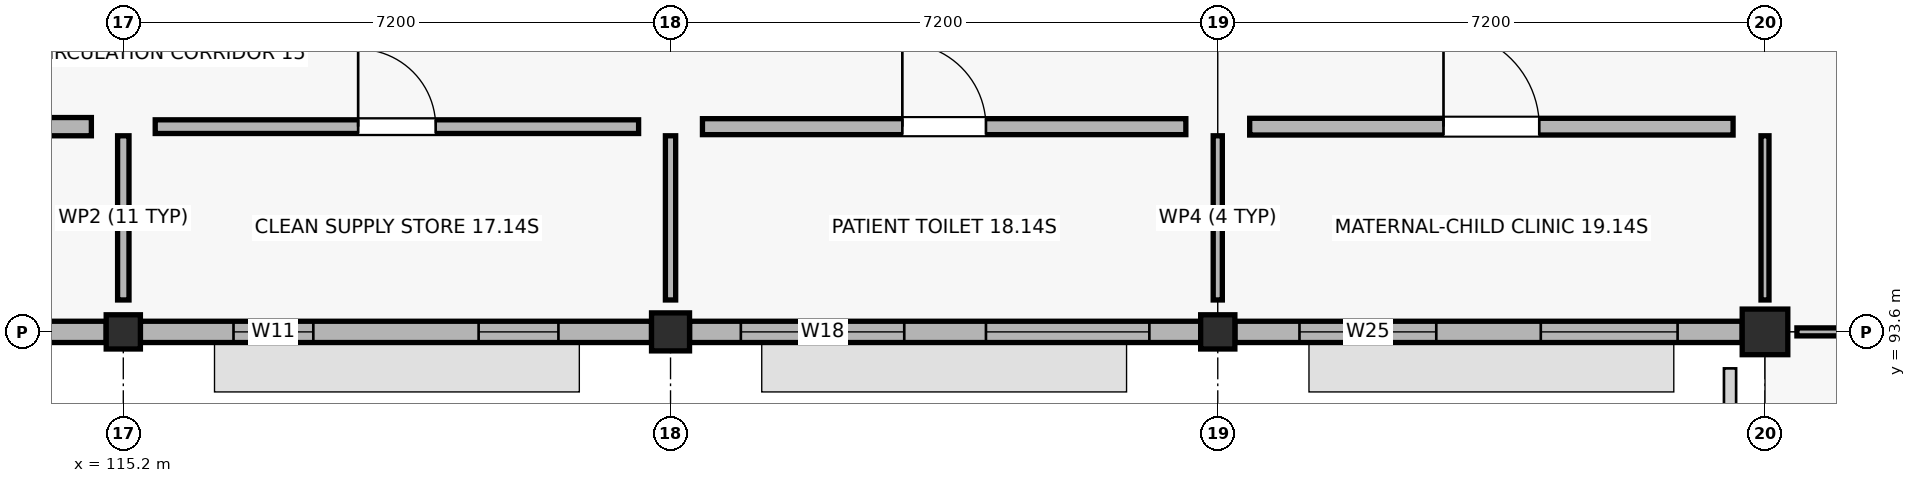
"""IFC4 building model, lengths in metres.
Left out: names, types, materials, properties, quantities, classifications, styles, units other than length and angle.
Written with IfcOpenShell. Run it as: python <this file> out.ifc"""

import sys

from ifc_helpers import new_model, si_unit, direction, frame, frame_2d, origin, origin_2d, place, context, subcontext, project, spatial, rectangle, extrude, element, fill, save


model = new_model("IFC4")
c1 = context("Model", 3, precision=1e-05, world=origin(), true_north=direction((0.0, 1.0)))
c2 = subcontext(c1, "Body", "Model", "MODEL_VIEW")
j1 = project(units=[si_unit("LENGTHUNIT", "METRE"), si_unit("PLANEANGLEUNIT", "RADIAN")], contexts=[c1])
p1 = place(None, origin())
s1 = spatial("IfcSite", under=j1, at=p1, CompositionType="ELEMENT")
p2 = place(p1, origin())
s2 = spatial("IfcBuilding", under=s1, at=p2, CompositionType="ELEMENT")
p3 = place(p2, frame((0.0, 0.0, 4.5)))
s3 = spatial("IfcBuildingStorey", under=s2, at=p3, CompositionType="ELEMENT", Elevation=4.5)
p4 = place(p3, frame((115.2, 93.6, 0.0), z_axis=(0.0, 0.0, 1.0), x_axis=(1.0, 0.0, 0.0)))
e1 = element("IfcColumn", 1, at=p4, inside=s3, PredefinedType="COLUMN", context=c2, shape_type="SweptSolid", body=[
    extrude(rectangle(XDim=0.45, YDim=0.45, at=origin_2d()), origin(), (0.0, 0.0, 1.0), 4.28),
])
p5 = place(p3, frame((122.4, 93.6, 0.0), z_axis=(0.0, 0.0, 1.0), x_axis=(1.0, 0.0, 0.0)))
e2 = element("IfcColumn", 2, at=p5, inside=s3, PredefinedType="COLUMN", context=c2, shape_type="SweptSolid", body=[
    extrude(rectangle(XDim=0.5, YDim=0.5, at=origin_2d()), origin(), (0.0, 0.0, 1.0), 4.28),
])
p6 = place(p3, frame((129.6, 93.6, 0.0), z_axis=(0.0, 0.0, 1.0), x_axis=(1.0, 0.0, 0.0)))
e3 = element("IfcColumn", 3, at=p6, inside=s3, PredefinedType="COLUMN", context=c2, shape_type="SweptSolid", body=[
    extrude(rectangle(XDim=0.45, YDim=0.45, at=origin_2d()), origin(), (0.0, 0.0, 1.0), 4.28),
])
p7 = place(p3, frame((136.8, 93.6, 0.0), z_axis=(0.0, 0.0, 1.0), x_axis=(1.0, 0.0, 0.0)))
e4 = element("IfcColumn", 4, at=p7, inside=s3, PredefinedType="COLUMN", context=c2, shape_type="SweptSolid", body=[
    extrude(rectangle(XDim=0.6, YDim=0.6, at=origin_2d()), origin(), (0.0, 0.0, 1.0), 4.5),
])
p8 = place(p3, frame((108.25, 93.6, 0.0), z_axis=(0.0, 0.0, 1.0), x_axis=(1.0, 0.0, 0.0)))
e5 = element("IfcWall", 5, at=p8, inside=s3, PredefinedType="STANDARD", context=c2, shape_type="SweptSolid", body=[
    extrude(rectangle(XDim=6.725, YDim=0.28, at=frame_2d((3.363, 0.0))), origin(), (0.0, 0.0, 1.0), 3.47),
])
p9 = place(p8, frame((1.075, 0.0, 0.9)))
e6 = element("IfcOpeningElement", 6, at=p9, cuts=e5, PredefinedType="OPENING", context=c2, shape_type="SweptSolid", body=[
    extrude(rectangle(XDim=1.35, YDim=1.25, at=frame_2d((0.675, 0.625))), frame((0.0, 0.15, 0.0), z_axis=(0.0, -1.0, 0.0), x_axis=(1.0, 0.0, 0.0)), (0.0, 0.0, 1.0), 0.3),
])
p10 = place(p8, frame((4.3, 0.0, 0.9)))
e7 = element("IfcOpeningElement", 7, at=p10, cuts=e5, PredefinedType="OPENING", context=c2, shape_type="SweptSolid", body=[
    extrude(rectangle(XDim=1.35, YDim=1.25, at=frame_2d((0.675, 0.625))), frame((0.0, 0.15, 0.0), z_axis=(0.0, -1.0, 0.0), x_axis=(1.0, 0.0, 0.0)), (0.0, 0.0, 1.0), 0.3),
])
p11 = place(p3, frame((115.425, 93.6, 0.0), z_axis=(0.0, 0.0, 1.0), x_axis=(1.0, 0.0, 0.0)))
e8 = element("IfcWall", 8, at=p11, inside=s3, PredefinedType="STANDARD", context=c2, shape_type="SweptSolid", body=[
    extrude(rectangle(XDim=6.725, YDim=0.28, at=frame_2d((3.362, 0.0))), origin(), (0.0, 0.0, 1.0), 3.47),
])
p12 = place(p11, frame((1.225, 0.0, 0.9)))
e9 = element("IfcOpeningElement", 9, at=p12, cuts=e8, PredefinedType="OPENING", context=c2, shape_type="SweptSolid", body=[
    extrude(rectangle(XDim=1.05, YDim=1.38, at=frame_2d((0.525, 0.69))), frame((0.0, 0.15, 0.0), z_axis=(0.0, -1.0, 0.0), x_axis=(1.0, 0.0, 0.0)), (0.0, 0.0, 1.0), 0.3),
])
p13 = place(p11, frame((4.45, 0.0, 0.9)))
e10 = element("IfcOpeningElement", 10, at=p13, cuts=e8, PredefinedType="OPENING", context=c2, shape_type="SweptSolid", body=[
    extrude(rectangle(XDim=1.05, YDim=1.38, at=frame_2d((0.525, 0.69))), frame((0.0, 0.15, 0.0), z_axis=(0.0, -1.0, 0.0), x_axis=(1.0, 0.0, 0.0)), (0.0, 0.0, 1.0), 0.3),
])
p14 = place(p3, frame((122.65, 93.6, 0.0), z_axis=(0.0, 0.0, 1.0), x_axis=(1.0, 0.0, 0.0)))
e11 = element("IfcWall", 11, at=p14, inside=s3, PredefinedType="STANDARD", context=c2, shape_type="SweptSolid", body=[
    extrude(rectangle(XDim=6.725, YDim=0.28, at=frame_2d((3.363, 0.0))), origin(), (0.0, 0.0, 1.0), 3.47),
])
p15 = place(p14, frame((0.675, 0.0, 0.9)))
e12 = element("IfcOpeningElement", 12, at=p15, cuts=e11, PredefinedType="OPENING", context=c2, shape_type="SweptSolid", body=[
    extrude(rectangle(XDim=2.15, YDim=1.38, at=frame_2d((1.075, 0.69))), frame((0.0, 0.15, 0.0), z_axis=(0.0, -1.0, 0.0), x_axis=(1.0, 0.0, 0.0)), (0.0, 0.0, 1.0), 0.3),
])
p16 = place(p14, frame((3.9, 0.0, 0.9)))
e13 = element("IfcOpeningElement", 13, at=p16, cuts=e11, PredefinedType="OPENING", context=c2, shape_type="SweptSolid", body=[
    extrude(rectangle(XDim=2.15, YDim=1.38, at=frame_2d((1.075, 0.69))), frame((0.0, 0.15, 0.0), z_axis=(0.0, -1.0, 0.0), x_axis=(1.0, 0.0, 0.0)), (0.0, 0.0, 1.0), 0.3),
])
p17 = place(p3, frame((129.825, 93.6, 0.0), z_axis=(0.0, 0.0, 1.0), x_axis=(1.0, 0.0, 0.0)))
e14 = element("IfcWall", 14, at=p17, inside=s3, PredefinedType="STANDARD", context=c2, shape_type="SweptSolid", body=[
    extrude(rectangle(XDim=6.675, YDim=0.28, at=frame_2d((3.337, 0.0))), origin(), (0.0, 0.0, 1.0), 3.47),
])
p18 = place(p17, frame((0.85, 0.0, 0.9)))
e15 = element("IfcOpeningElement", 15, at=p18, cuts=e14, PredefinedType="OPENING", context=c2, shape_type="SweptSolid", body=[
    extrude(rectangle(XDim=1.8, YDim=1.5, at=frame_2d((0.9, 0.75))), frame((0.0, 0.15, 0.0), z_axis=(0.0, -1.0, 0.0), x_axis=(1.0, 0.0, 0.0)), (0.0, 0.0, 1.0), 0.3),
])
p19 = place(p17, frame((4.025, 0.0, 0.9)))
e16 = element("IfcOpeningElement", 16, at=p19, cuts=e14, PredefinedType="OPENING", context=c2, shape_type="SweptSolid", body=[
    extrude(rectangle(XDim=1.8, YDim=1.5, at=frame_2d((0.9, 0.75))), frame((0.0, 0.15, 0.0), z_axis=(0.0, -1.0, 0.0), x_axis=(1.0, 0.0, 0.0)), (0.0, 0.0, 1.0), 0.3),
])
p20 = place(p3, frame((108.42, 96.3, 0.0), z_axis=(0.0, 0.0, 1.0), x_axis=(1.0, 0.0, 0.0)))
e17 = element("IfcWall", 17, at=p20, inside=s3, PredefinedType="SOLIDWALL", context=c2, shape_type="SweptSolid", body=[
    extrude(rectangle(XDim=6.36, YDim=0.24, at=frame_2d((3.18, 0.0))), origin(), (0.0, 0.0, 1.0), 3.36),
])
p21 = place(p20, frame((2.505, 0.0, 0.0)))
e18 = element("IfcOpeningElement", 18, at=p21, cuts=e17, PredefinedType="OPENING", context=c2, shape_type="SweptSolid", body=[
    extrude(rectangle(XDim=1.35, YDim=2.2, at=frame_2d((0.675, 1.1))), frame((0.0, 0.13, 0.0), z_axis=(0.0, -1.0, 0.0), x_axis=(1.0, 0.0, 0.0)), (0.0, 0.0, 1.0), 0.26),
])
p22 = place(p3, frame((115.2, 94.02, 0.0), z_axis=(0.0, 0.0, 1.0), x_axis=(0.0, 1.0, 0.0)))
e19 = element("IfcWall", 19, at=p22, inside=s3, PredefinedType="PARTITIONING", context=c2, shape_type="SweptSolid", body=[
    extrude(rectangle(XDim=2.16, YDim=0.15, at=frame_2d((1.08, 0.0))), origin(), (0.0, 0.0, 1.0), 3.36),
])
p23 = place(p3, frame((115.62, 96.3, 0.0), z_axis=(0.0, 0.0, 1.0), x_axis=(1.0, 0.0, 0.0)))
e20 = element("IfcWall", 20, at=p23, inside=s3, PredefinedType="PARTITIONING", context=c2, shape_type="SweptSolid", body=[
    extrude(rectangle(XDim=6.36, YDim=0.18, at=frame_2d((3.18, 0.0))), origin(), (0.0, 0.0, 1.0), 3.36),
])
p24 = place(p23, frame((2.67, 0.0, 0.0)))
e21 = element("IfcOpeningElement", 21, at=p24, cuts=e20, PredefinedType="OPENING", context=c2, shape_type="SweptSolid", body=[
    extrude(rectangle(XDim=1.02, YDim=2.09, at=frame_2d((0.51, 1.045))), frame((0.0, 0.1, 0.0), z_axis=(0.0, -1.0, 0.0), x_axis=(1.0, 0.0, 0.0)), (0.0, 0.0, 1.0), 0.2),
])
p25 = place(p3, frame((122.4, 94.02, 0.0), z_axis=(0.0, 0.0, 1.0), x_axis=(0.0, 1.0, 0.0)))
e22 = element("IfcWall", 22, at=p25, inside=s3, PredefinedType="PARTITIONING", context=c2, shape_type="SweptSolid", body=[
    extrude(rectangle(XDim=2.16, YDim=0.135, at=frame_2d((1.08, 0.0))), origin(), (0.0, 0.0, 1.0), 3.36),
])
p26 = place(p3, frame((122.82, 96.3, 0.0), z_axis=(0.0, 0.0, 1.0), x_axis=(1.0, 0.0, 0.0)))
e23 = element("IfcWall", 23, at=p26, inside=s3, PredefinedType="PLUMBINGWALL", context=c2, shape_type="SweptSolid", body=[
    extrude(rectangle(XDim=6.36, YDim=0.21, at=frame_2d((3.18, 0.0))), origin(), (0.0, 0.0, 1.0), 3.36),
])
p27 = place(p26, frame((2.63, 0.0, 0.0)))
e24 = element("IfcOpeningElement", 24, at=p27, cuts=e23, PredefinedType="OPENING", context=c2, shape_type="SweptSolid", body=[
    extrude(rectangle(XDim=1.1, YDim=2.09, at=frame_2d((0.55, 1.045))), frame((0.0, 0.115, 0.0), z_axis=(0.0, -1.0, 0.0), x_axis=(1.0, 0.0, 0.0)), (0.0, 0.0, 1.0), 0.23),
])
p28 = place(p3, frame((129.6, 94.02, 0.0), z_axis=(0.0, 0.0, 1.0), x_axis=(0.0, 1.0, 0.0)))
e25 = element("IfcWall", 25, at=p28, inside=s3, PredefinedType="PARTITIONING", context=c2, shape_type="SweptSolid", body=[
    extrude(rectangle(XDim=2.16, YDim=0.12, at=frame_2d((1.08, 0.0))), origin(), (0.0, 0.0, 1.0), 3.36),
])
p29 = place(p3, frame((130.02, 96.3, 0.0), z_axis=(0.0, 0.0, 1.0), x_axis=(1.0, 0.0, 0.0)))
e26 = element("IfcWall", 26, at=p29, inside=s3, PredefinedType="SOLIDWALL", context=c2, shape_type="SweptSolid", body=[
    extrude(rectangle(XDim=6.36, YDim=0.22, at=frame_2d((3.18, 0.0))), origin(), (0.0, 0.0, 1.0), 3.36),
])
p30 = place(p29, frame((2.55, 0.0, 0.0)))
e27 = element("IfcOpeningElement", 27, at=p30, cuts=e26, PredefinedType="OPENING", context=c2, shape_type="SweptSolid", body=[
    extrude(rectangle(XDim=1.26, YDim=2.09, at=frame_2d((0.63, 1.045))), frame((0.0, 0.12, 0.0), z_axis=(0.0, -1.0, 0.0), x_axis=(1.0, 0.0, 0.0)), (0.0, 0.0, 1.0), 0.24),
])
for number, where, z_axis, x_axis in (
    (28, (136.8, 94.02, 0.0), (0.0, 0.0, 1.0), (0.0, 1.0, 0.0)),
    (29, (137.22, 93.6, 0.0), (0.0, 0.0, 1.0), (1.0, 0.0, 0.0)),
):
    element("IfcWall", number, at=place(p3, frame(where, z_axis=z_axis, x_axis=x_axis)), inside=s3, PredefinedType="PARTITIONING", context=c2, shape_type="SweptSolid", body=[
        extrude(rectangle(XDim=2.16, YDim=0.105, at=frame_2d((1.08, 0.0))), origin(), (0.0, 0.0, 1.0), 3.36),
    ])
p31 = place(p12, origin())
e30 = element("IfcWindow", 30, at=p31, inside=s3, PartitioningType="SINGLE_PANEL", PredefinedType="WINDOW", context=c2, shape_type="SweptSolid", body=[
    extrude(rectangle(XDim=1.05, YDim=1.38, at=frame_2d((0.525, 0.69))), frame((0.0, 0.03, 0.0), z_axis=(0.0, -1.0, 0.0), x_axis=(1.0, 0.0, 0.0)), (0.0, 0.0, 1.0), 0.06),
])
fill(e9, e30)
p32 = place(p13, origin())
e31 = element("IfcWindow", 31, at=p32, inside=s3, PartitioningType="SINGLE_PANEL", PredefinedType="WINDOW", context=c2, shape_type="SweptSolid", body=[
    extrude(rectangle(XDim=1.05, YDim=1.38, at=frame_2d((0.525, 0.69))), frame((0.0, 0.03, 0.0), z_axis=(0.0, -1.0, 0.0), x_axis=(1.0, 0.0, 0.0)), (0.0, 0.0, 1.0), 0.06),
])
fill(e10, e31)
p33 = place(p15, origin())
e32 = element("IfcWindow", 32, at=p33, inside=s3, PartitioningType="SINGLE_PANEL", PredefinedType="WINDOW", context=c2, shape_type="SweptSolid", body=[
    extrude(rectangle(XDim=2.15, YDim=1.38, at=frame_2d((1.075, 0.69))), frame((0.0, 0.03, 0.0), z_axis=(0.0, -1.0, 0.0), x_axis=(1.0, 0.0, 0.0)), (0.0, 0.0, 1.0), 0.06),
])
fill(e12, e32)
p34 = place(p16, origin())
e33 = element("IfcWindow", 33, at=p34, inside=s3, PartitioningType="SINGLE_PANEL", PredefinedType="WINDOW", context=c2, shape_type="SweptSolid", body=[
    extrude(rectangle(XDim=2.15, YDim=1.38, at=frame_2d((1.075, 0.69))), frame((0.0, 0.03, 0.0), z_axis=(0.0, -1.0, 0.0), x_axis=(1.0, 0.0, 0.0)), (0.0, 0.0, 1.0), 0.06),
])
fill(e13, e33)
p35 = place(p18, origin())
e34 = element("IfcWindow", 34, at=p35, inside=s3, PartitioningType="SINGLE_PANEL", PredefinedType="WINDOW", context=c2, shape_type="SweptSolid", body=[
    extrude(rectangle(XDim=1.8, YDim=1.5, at=frame_2d((0.9, 0.75))), frame((0.0, 0.03, 0.0), z_axis=(0.0, -1.0, 0.0), x_axis=(1.0, 0.0, 0.0)), (0.0, 0.0, 1.0), 0.06),
])
fill(e15, e34)
p36 = place(p19, origin())
e35 = element("IfcWindow", 35, at=p36, inside=s3, PartitioningType="SINGLE_PANEL", PredefinedType="WINDOW", context=c2, shape_type="SweptSolid", body=[
    extrude(rectangle(XDim=1.8, YDim=1.5, at=frame_2d((0.9, 0.75))), frame((0.0, 0.03, 0.0), z_axis=(0.0, -1.0, 0.0), x_axis=(1.0, 0.0, 0.0)), (0.0, 0.0, 1.0), 0.06),
])
fill(e16, e35)
p37 = place(p24, origin())
e36 = element("IfcDoor", 36, at=p37, inside=s3, OperationType="SINGLE_SWING_LEFT", PredefinedType="DOOR", context=c2, shape_type="SweptSolid", body=[
    extrude(rectangle(XDim=1.02, YDim=2.09, at=frame_2d((0.51, 1.045))), frame((0.0, 0.025, 0.0), z_axis=(0.0, -1.0, 0.0), x_axis=(1.0, 0.0, 0.0)), (0.0, 0.0, 1.0), 0.05),
])
fill(e21, e36)
p38 = place(p27, origin())
e37 = element("IfcDoor", 37, at=p38, inside=s3, OperationType="SINGLE_SWING_LEFT", PredefinedType="DOOR", context=c2, shape_type="SweptSolid", body=[
    extrude(rectangle(XDim=1.1, YDim=2.09, at=frame_2d((0.55, 1.045))), frame((0.0, 0.025, 0.0), z_axis=(0.0, -1.0, 0.0), x_axis=(1.0, 0.0, 0.0)), (0.0, 0.0, 1.0), 0.05),
])
fill(e24, e37)
p39 = place(p30, origin())
e38 = element("IfcDoor", 38, at=p39, inside=s3, OperationType="SINGLE_SWING_LEFT", PredefinedType="DOOR", context=c2, shape_type="SweptSolid", body=[
    extrude(rectangle(XDim=1.26, YDim=2.09, at=frame_2d((0.63, 1.045))), frame((0.0, 0.025, 0.0), z_axis=(0.0, -1.0, 0.0), x_axis=(1.0, 0.0, 0.0)), (0.0, 0.0, 1.0), 0.05),
])
fill(e27, e38)
save(model, sys.argv[1])
